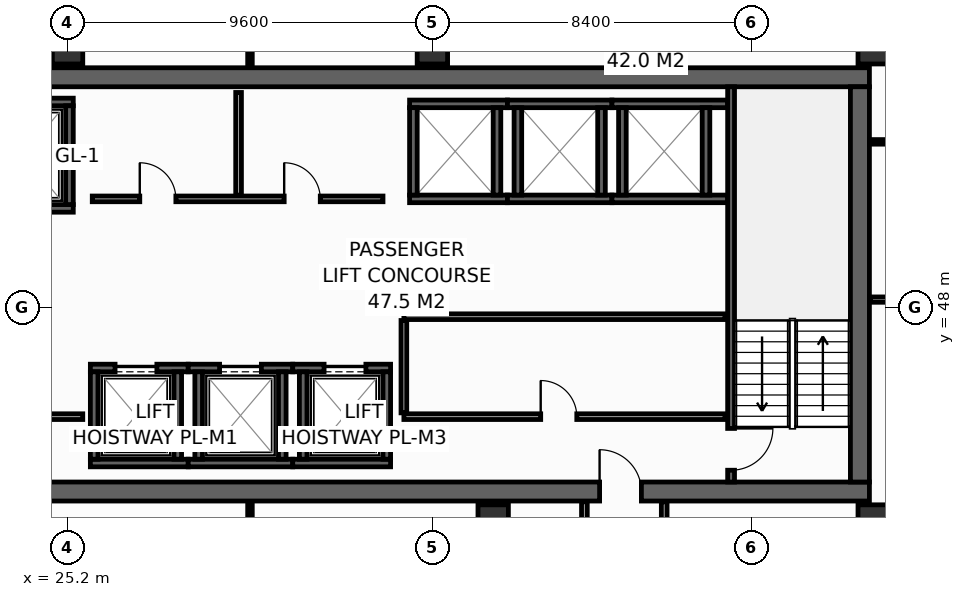
"""IFC4 building model, lengths in metres.
Left out: names, types, materials, properties, quantities, classifications, styles, units other than length and angle.
Written with IfcOpenShell. Run it as: python <this file> out.ifc"""

import sys

from ifc_helpers import new_model, si_unit, direction, frame, frame_2d, origin, origin_2d, place, context, subcontext, project, spatial, rectangle, hollow_rectangle, extrude, element, fill, save


model = new_model("IFC4")
c1 = context("Model", 3, precision=1e-05, world=origin(), true_north=direction((0.0, 1.0)))
c2 = subcontext(c1, "Body", "Model", "MODEL_VIEW")
j1 = project(units=[si_unit("LENGTHUNIT", "METRE"), si_unit("PLANEANGLEUNIT", "RADIAN")], contexts=[c1])
p1 = place(None, origin())
s1 = spatial("IfcSite", under=j1, at=p1, CompositionType="ELEMENT")
p2 = place(p1, origin())
s2 = spatial("IfcBuilding", under=s1, at=p2, CompositionType="ELEMENT")
p3 = place(p2, frame((0.0, 0.0, 182.8)))
s3 = spatial("IfcBuildingStorey", under=s2, at=p3, CompositionType="ELEMENT", Elevation=182.8)
p4 = place(p3, frame((13.6, 43.15, 0.0), z_axis=(0.0, 0.0, 1.0), x_axis=(1.0, 0.0, 0.0)))
e1 = element("IfcWall", 1, at=p4, inside=s3, PredefinedType="SHEAR", context=c2, shape_type="SweptSolid", body=[
    extrude(rectangle(XDim=32.7, YDim=0.5, at=frame_2d((16.35, 0.0))), origin(), (0.0, 0.0, 1.0), 3.55),
])
p5 = place(p4, frame((5.4, 0.0, 0.0)))
e2 = element("IfcOpeningElement", 2, at=p5, cuts=e1, PredefinedType="OPENING", context=c2, shape_type="SweptSolid", body=[
    extrude(rectangle(XDim=1.1, YDim=2.15, at=frame_2d((0.55, 1.075))), frame((0.0, 0.26, 0.0), z_axis=(0.0, -1.0, 0.0), x_axis=(1.0, 0.0, 0.0)), (0.0, 0.0, 1.0), 0.52),
])
p6 = place(p4, frame((25.6, 0.0, 0.0)))
e3 = element("IfcOpeningElement", 3, at=p6, cuts=e1, PredefinedType="OPENING", context=c2, shape_type="SweptSolid", body=[
    extrude(rectangle(XDim=1.1, YDim=2.15, at=frame_2d((0.55, 1.075))), frame((0.0, 0.26, 0.0), z_axis=(0.0, -1.0, 0.0), x_axis=(1.0, 0.0, 0.0)), (0.0, 0.0, 1.0), 0.52),
])
p7 = place(p3, frame((13.6, 54.05, 0.0), z_axis=(0.0, 0.0, 1.0), x_axis=(1.0, 0.0, 0.0)))
e4 = element("IfcWall", 4, at=p7, inside=s3, PredefinedType="SHEAR", context=c2, shape_type="SweptSolid", body=[
    extrude(rectangle(XDim=32.7, YDim=0.5, at=frame_2d((16.35, 0.0))), origin(), (0.0, 0.0, 1.0), 3.55),
])
p8 = place(p3, frame((46.05, 43.4, 0.0), z_axis=(0.0, 0.0, 1.0), x_axis=(0.0, 1.0, 0.0)))
e5 = element("IfcWall", 5, at=p8, inside=s3, PredefinedType="SHEAR", context=c2, shape_type="SweptSolid", body=[
    extrude(rectangle(XDim=10.4, YDim=0.5, at=frame_2d((5.2, 0.0))), origin(), (0.0, 0.0, 1.0), 3.55),
])
for number, where, z_axis, x_axis in (
    (6, (25.2, 54.8, 0.0), (0.0, 0.0, 1.0), (1.0, 0.0, 0.0)),
    (7, (34.8, 54.8, 0.0), (0.0, 0.0, 1.0), (1.0, 0.0, 0.0)),
    (8, (46.4, 54.8, 0.0), (0.0, 0.0, 1.0), (1.0, 0.0, 0.0)),
    (9, (36.4, 42.4, 0.0), (0.0, 0.0, 1.0), (1.0, 0.0, 0.0)),
    (10, (46.4, 42.4, 0.0), (0.0, 0.0, 1.0), (1.0, 0.0, 0.0)),
):
    element("IfcColumn", number, at=place(p3, frame(where, z_axis=z_axis, x_axis=x_axis)), inside=s3, PredefinedType="COLUMN", context=c2, shape_type="SweptSolid", body=[
        extrude(hollow_rectangle(XDim=0.8, YDim=0.8, WallThickness=0.036, at=origin_2d()), origin(), (0.0, 0.0, 1.0), 3.8),
    ])
p9 = place(p3, frame((22.5, 50.6, 0.0), z_axis=(0.0, 0.0, 1.0), x_axis=(1.0, 0.0, 0.0)))
e11 = element("IfcWall", 11, at=p9, inside=s3, PredefinedType="SHEAR", context=c2, shape_type="SweptSolid", body=[
    extrude(rectangle(XDim=2.85, YDim=0.2, at=frame_2d((1.425, 0.0))), origin(), (0.0, 0.0, 1.0), 3.55),
])
p10 = place(p9, frame((0.925, 0.0, 0.0)))
e12 = element("IfcOpeningElement", 12, at=p10, cuts=e11, PredefinedType="OPENING", context=c2, shape_type="SweptSolid", body=[
    extrude(rectangle(XDim=1.25, YDim=2.3, at=frame_2d((0.625, 1.15))), frame((0.0, 0.11, 0.0), z_axis=(0.0, -1.0, 0.0), x_axis=(1.0, 0.0, 0.0)), (0.0, 0.0, 1.0), 0.22),
])
p11 = place(p3, frame((22.5, 53.4, 0.0), z_axis=(0.0, 0.0, 1.0), x_axis=(1.0, 0.0, 0.0)))
e13 = element("IfcWall", 13, at=p11, inside=s3, PredefinedType="SHEAR", context=c2, shape_type="SweptSolid", body=[
    extrude(rectangle(XDim=2.85, YDim=0.2, at=frame_2d((1.425, 0.0))), origin(), (0.0, 0.0, 1.0), 3.55),
])
p12 = place(p3, frame((25.25, 50.7, 0.0), z_axis=(0.0, 0.0, 1.0), x_axis=(0.0, 1.0, 0.0)))
e14 = element("IfcWall", 14, at=p12, inside=s3, PredefinedType="SHEAR", context=c2, shape_type="SweptSolid", body=[
    extrude(rectangle(XDim=2.6, YDim=0.2, at=frame_2d((1.3, 0.0))), origin(), (0.0, 0.0, 1.0), 3.55),
])
p13 = place(p3, frame((25.8, 43.9, 0.0), z_axis=(0.0, 0.0, 1.0), x_axis=(1.0, 0.0, 0.0)))
e15 = element("IfcWall", 15, at=p13, inside=s3, PredefinedType="SHEAR", context=c2, shape_type="SweptSolid", body=[
    extrude(rectangle(XDim=2.575, YDim=0.2, at=frame_2d((1.288, 0.0))), origin(), (0.0, 0.0, 1.0), 3.55),
])
p14 = place(p3, frame((25.8, 46.4, 0.0), z_axis=(0.0, 0.0, 1.0), x_axis=(1.0, 0.0, 0.0)))
e16 = element("IfcWall", 16, at=p14, inside=s3, PredefinedType="SHEAR", context=c2, shape_type="SweptSolid", body=[
    extrude(rectangle(XDim=2.575, YDim=0.2, at=frame_2d((1.288, 0.0))), origin(), (0.0, 0.0, 1.0), 3.55),
])
p15 = place(p14, frame((0.65, 0.0, 0.0)))
e17 = element("IfcOpeningElement", 17, at=p15, cuts=e16, PredefinedType="OPENING", context=c2, shape_type="SweptSolid", body=[
    extrude(rectangle(XDim=1.1, YDim=2.2, at=frame_2d((0.55, 1.1))), frame((0.0, 0.11, 0.0), z_axis=(0.0, -1.0, 0.0), x_axis=(1.0, 0.0, 0.0)), (0.0, 0.0, 1.0), 0.22),
])
for number, where, z_axis, x_axis in (
    (18, (25.9, 44.0, 0.0), (0.0, 0.0, 1.0), (0.0, 1.0, 0.0)),
    (19, (28.1, 44.0, 0.0), (0.0, 0.0, 1.0), (0.0, 1.0, 0.0)),
):
    element("IfcWall", number, at=place(p3, frame(where, z_axis=z_axis, x_axis=x_axis)), inside=s3, PredefinedType="SHEAR", context=c2, shape_type="SweptSolid", body=[
        extrude(rectangle(XDim=2.3, YDim=0.2, at=frame_2d((1.15, 0.0))), origin(), (0.0, 0.0, 1.0), 3.55),
    ])
p16 = place(p3, frame((28.375, 43.9, 0.0), z_axis=(0.0, 0.0, 1.0), x_axis=(1.0, 0.0, 0.0)))
e20 = element("IfcWall", 20, at=p16, inside=s3, PredefinedType="SHEAR", context=c2, shape_type="SweptSolid", body=[
    extrude(rectangle(XDim=2.75, YDim=0.2, at=frame_2d((1.375, 0.0))), origin(), (0.0, 0.0, 1.0), 3.55),
])
p17 = place(p3, frame((28.375, 46.4, 0.0), z_axis=(0.0, 0.0, 1.0), x_axis=(1.0, 0.0, 0.0)))
e21 = element("IfcWall", 21, at=p17, inside=s3, PredefinedType="SHEAR", context=c2, shape_type="SweptSolid", body=[
    extrude(rectangle(XDim=2.75, YDim=0.2, at=frame_2d((1.375, 0.0))), origin(), (0.0, 0.0, 1.0), 3.55),
])
p18 = place(p17, frame((0.825, 0.0, 0.0)))
e22 = element("IfcOpeningElement", 22, at=p18, cuts=e21, PredefinedType="OPENING", context=c2, shape_type="SweptSolid", body=[
    extrude(rectangle(XDim=1.1, YDim=2.2, at=frame_2d((0.55, 1.1))), frame((0.0, 0.11, 0.0), z_axis=(0.0, -1.0, 0.0), x_axis=(1.0, 0.0, 0.0)), (0.0, 0.0, 1.0), 0.22),
])
for number, where, z_axis, x_axis in (
    (23, (28.65, 44.0, 0.0), (0.0, 0.0, 1.0), (0.0, 1.0, 0.0)),
    (24, (30.85, 44.0, 0.0), (0.0, 0.0, 1.0), (0.0, 1.0, 0.0)),
):
    element("IfcWall", number, at=place(p3, frame(where, z_axis=z_axis, x_axis=x_axis)), inside=s3, PredefinedType="SHEAR", context=c2, shape_type="SweptSolid", body=[
        extrude(rectangle(XDim=2.3, YDim=0.2, at=frame_2d((1.15, 0.0))), origin(), (0.0, 0.0, 1.0), 3.55),
    ])
p19 = place(p3, frame((31.125, 43.9, 0.0), z_axis=(0.0, 0.0, 1.0), x_axis=(1.0, 0.0, 0.0)))
e25 = element("IfcWall", 25, at=p19, inside=s3, PredefinedType="SHEAR", context=c2, shape_type="SweptSolid", body=[
    extrude(rectangle(XDim=2.575, YDim=0.2, at=frame_2d((1.288, 0.0))), origin(), (0.0, 0.0, 1.0), 3.55),
])
p20 = place(p3, frame((31.125, 46.4, 0.0), z_axis=(0.0, 0.0, 1.0), x_axis=(1.0, 0.0, 0.0)))
e26 = element("IfcWall", 26, at=p20, inside=s3, PredefinedType="SHEAR", context=c2, shape_type="SweptSolid", body=[
    extrude(rectangle(XDim=2.575, YDim=0.2, at=frame_2d((1.288, 0.0))), origin(), (0.0, 0.0, 1.0), 3.55),
])
p21 = place(p20, frame((0.825, 0.0, 0.0)))
e27 = element("IfcOpeningElement", 27, at=p21, cuts=e26, PredefinedType="OPENING", context=c2, shape_type="SweptSolid", body=[
    extrude(rectangle(XDim=1.1, YDim=2.2, at=frame_2d((0.55, 1.1))), frame((0.0, 0.11, 0.0), z_axis=(0.0, -1.0, 0.0), x_axis=(1.0, 0.0, 0.0)), (0.0, 0.0, 1.0), 0.22),
])
for number, where, z_axis, x_axis in (
    (28, (31.4, 44.0, 0.0), (0.0, 0.0, 1.0), (0.0, 1.0, 0.0)),
    (29, (33.6, 44.0, 0.0), (0.0, 0.0, 1.0), (0.0, 1.0, 0.0)),
):
    element("IfcWall", number, at=place(p3, frame(where, z_axis=z_axis, x_axis=x_axis)), inside=s3, PredefinedType="SHEAR", context=c2, shape_type="SweptSolid", body=[
        extrude(rectangle(XDim=2.3, YDim=0.2, at=frame_2d((1.15, 0.0))), origin(), (0.0, 0.0, 1.0), 3.55),
    ])
for number, where, z_axis, x_axis in (
    (30, (34.2, 50.85, 0.0), (0.0, 0.0, 1.0), (1.0, 0.0, 0.0)),
    (31, (34.2, 53.35, 0.0), (0.0, 0.0, 1.0), (1.0, 0.0, 0.0)),
):
    element("IfcWall", number, at=place(p3, frame(where, z_axis=z_axis, x_axis=x_axis)), inside=s3, PredefinedType="SHEAR", context=c2, shape_type="SweptSolid", body=[
        extrude(rectangle(XDim=2.575, YDim=0.2, at=frame_2d((1.288, 0.0))), origin(), (0.0, 0.0, 1.0), 3.55),
    ])
for number, where, z_axis, x_axis in (
    (32, (34.3, 50.95, 0.0), (0.0, 0.0, 1.0), (0.0, 1.0, 0.0)),
    (33, (36.5, 50.95, 0.0), (0.0, 0.0, 1.0), (0.0, 1.0, 0.0)),
):
    element("IfcWall", number, at=place(p3, frame(where, z_axis=z_axis, x_axis=x_axis)), inside=s3, PredefinedType="SHEAR", context=c2, shape_type="SweptSolid", body=[
        extrude(rectangle(XDim=2.3, YDim=0.2, at=frame_2d((1.15, 0.0))), origin(), (0.0, 0.0, 1.0), 3.55),
    ])
for number, where, z_axis, x_axis in (
    (34, (36.775, 50.85, 0.0), (0.0, 0.0, 1.0), (1.0, 0.0, 0.0)),
    (35, (36.775, 53.35, 0.0), (0.0, 0.0, 1.0), (1.0, 0.0, 0.0)),
):
    element("IfcWall", number, at=place(p3, frame(where, z_axis=z_axis, x_axis=x_axis)), inside=s3, PredefinedType="SHEAR", context=c2, shape_type="SweptSolid", body=[
        extrude(rectangle(XDim=2.75, YDim=0.2, at=frame_2d((1.375, 0.0))), origin(), (0.0, 0.0, 1.0), 3.55),
    ])
for number, where, z_axis, x_axis in (
    (36, (37.05, 50.95, 0.0), (0.0, 0.0, 1.0), (0.0, 1.0, 0.0)),
    (37, (39.25, 50.95, 0.0), (0.0, 0.0, 1.0), (0.0, 1.0, 0.0)),
):
    element("IfcWall", number, at=place(p3, frame(where, z_axis=z_axis, x_axis=x_axis)), inside=s3, PredefinedType="SHEAR", context=c2, shape_type="SweptSolid", body=[
        extrude(rectangle(XDim=2.3, YDim=0.2, at=frame_2d((1.15, 0.0))), origin(), (0.0, 0.0, 1.0), 3.55),
    ])
for number, where, z_axis, x_axis in (
    (38, (39.525, 50.85, 0.0), (0.0, 0.0, 1.0), (1.0, 0.0, 0.0)),
    (39, (39.525, 53.35, 0.0), (0.0, 0.0, 1.0), (1.0, 0.0, 0.0)),
):
    element("IfcWall", number, at=place(p3, frame(where, z_axis=z_axis, x_axis=x_axis)), inside=s3, PredefinedType="SHEAR", context=c2, shape_type="SweptSolid", body=[
        extrude(rectangle(XDim=3.045, YDim=0.2, at=frame_2d((1.522, 0.0))), origin(), (0.0, 0.0, 1.0), 3.55),
    ])
for number, where, z_axis, x_axis in (
    (40, (39.8, 50.95, 0.0), (0.0, 0.0, 1.0), (0.0, 1.0, 0.0)),
    (41, (42.0, 50.95, 0.0), (0.0, 0.0, 1.0), (0.0, 1.0, 0.0)),
):
    element("IfcWall", number, at=place(p3, frame(where, z_axis=z_axis, x_axis=x_axis)), inside=s3, PredefinedType="SHEAR", context=c2, shape_type="SweptSolid", body=[
        extrude(rectangle(XDim=2.3, YDim=0.2, at=frame_2d((1.15, 0.0))), origin(), (0.0, 0.0, 1.0), 3.55),
    ])
p22 = place(p3, frame((42.66, 53.8, 0.0), z_axis=(0.0, 0.0, 1.0), x_axis=(0.0, -1.0, 0.0)))
e42 = element("IfcWall", 42, at=p22, inside=s3, PredefinedType="SHEAR", context=c2, shape_type="SweptSolid", body=[
    extrude(rectangle(XDim=10.4, YDim=0.18, at=frame_2d((5.2, 0.0))), origin(), (0.0, 0.0, 1.0), 3.55),
])
p23 = place(p22, frame((8.99, 0.0, 0.0)))
e43 = element("IfcOpeningElement", 43, at=p23, cuts=e42, PredefinedType="OPENING", context=c2, shape_type="SweptSolid", body=[
    extrude(rectangle(XDim=1.1, YDim=2.15, at=frame_2d((0.55, 1.075))), frame((0.0, 0.1, 0.0), z_axis=(0.0, -1.0, 0.0), x_axis=(1.0, 0.0, 0.0)), (0.0, 0.0, 1.0), 0.2),
])
p24 = place(p3, frame((22.68, 45.12, 0.0), z_axis=(0.0, 0.0, 1.0), x_axis=(1.0, 0.0, 0.0)))
e44 = element("IfcWall", 44, at=p24, inside=s3, PredefinedType="PARTITIONING", context=c2, shape_type="SweptSolid", body=[
    extrude(rectangle(XDim=2.92, YDim=0.15, at=frame_2d((1.46, 0.0))), origin(), (0.0, 0.0, 1.0), 3.55),
])
p25 = place(p24, frame((0.85, 0.0, 0.0)))
e45 = element("IfcOpeningElement", 45, at=p25, cuts=e44, PredefinedType="OPENING", context=c2, shape_type="SweptSolid", body=[
    extrude(rectangle(XDim=1.1, YDim=2.15, at=frame_2d((0.55, 1.075))), frame((0.0, 0.085, 0.0), z_axis=(0.0, -1.0, 0.0), x_axis=(1.0, 0.0, 0.0)), (0.0, 0.0, 1.0), 0.17),
])
p26 = place(p3, frame((34.05, 45.12, 0.0), z_axis=(0.0, 0.0, 1.0), x_axis=(1.0, 0.0, 0.0)))
e46 = element("IfcWall", 46, at=p26, inside=s3, PredefinedType="PARTITIONING", context=c2, shape_type="SweptSolid", body=[
    extrude(rectangle(XDim=8.45, YDim=0.15, at=frame_2d((4.225, 0.0))), origin(), (0.0, 0.0, 1.0), 3.55),
])
p27 = place(p26, frame((3.6, 0.0, 0.0)))
e47 = element("IfcOpeningElement", 47, at=p27, cuts=e46, PredefinedType="OPENING", context=c2, shape_type="SweptSolid", body=[
    extrude(rectangle(XDim=0.95, YDim=2.15, at=frame_2d((0.475, 1.075))), frame((0.0, 0.085, 0.0), z_axis=(0.0, -1.0, 0.0), x_axis=(1.0, 0.0, 0.0)), (0.0, 0.0, 1.0), 0.17),
])
p28 = place(p3, frame((34.05, 47.75, 0.0), z_axis=(0.0, 0.0, 1.0), x_axis=(1.0, 0.0, 0.0)))
e48 = element("IfcWall", 48, at=p28, inside=s3, PredefinedType="PARTITIONING", context=c2, shape_type="SweptSolid", body=[
    extrude(rectangle(XDim=8.45, YDim=0.15, at=frame_2d((4.225, 0.0))), origin(), (0.0, 0.0, 1.0), 3.55),
])
p29 = place(p3, frame((34.05, 45.22, 0.0), z_axis=(0.0, 0.0, 1.0), x_axis=(0.0, 1.0, 0.0)))
e49 = element("IfcWall", 49, at=p29, inside=s3, PredefinedType="PARTITIONING", context=c2, shape_type="SweptSolid", body=[
    extrude(rectangle(XDim=2.43, YDim=0.15, at=frame_2d((1.215, 0.0))), origin(), (0.0, 0.0, 1.0), 3.55),
])
p30 = place(p3, frame((25.85, 50.85, 0.0), z_axis=(0.0, 0.0, 1.0), x_axis=(1.0, 0.0, 0.0)))
e50 = element("IfcWall", 50, at=p30, inside=s3, PredefinedType="PARTITIONING", context=c2, shape_type="SweptSolid", body=[
    extrude(rectangle(XDim=7.65, YDim=0.15, at=frame_2d((3.825, 0.0))), origin(), (0.0, 0.0, 1.0), 3.55),
])
p31 = place(p30, frame((1.25, 0.0, 0.0)))
e51 = element("IfcOpeningElement", 51, at=p31, cuts=e50, PredefinedType="OPENING", context=c2, shape_type="SweptSolid", body=[
    extrude(rectangle(XDim=0.95, YDim=2.15, at=frame_2d((0.475, 1.075))), frame((0.0, 0.085, 0.0), z_axis=(0.0, -1.0, 0.0), x_axis=(1.0, 0.0, 0.0)), (0.0, 0.0, 1.0), 0.17),
])
p32 = place(p30, frame((5.05, 0.0, 0.0)))
e52 = element("IfcOpeningElement", 52, at=p32, cuts=e50, PredefinedType="OPENING", context=c2, shape_type="SweptSolid", body=[
    extrude(rectangle(XDim=0.95, YDim=2.15, at=frame_2d((0.475, 1.075))), frame((0.0, 0.085, 0.0), z_axis=(0.0, -1.0, 0.0), x_axis=(1.0, 0.0, 0.0)), (0.0, 0.0, 1.0), 0.17),
])
p33 = place(p3, frame((29.7, 50.95, 0.0), z_axis=(0.0, 0.0, 1.0), x_axis=(0.0, 1.0, 0.0)))
e53 = element("IfcWall", 53, at=p33, inside=s3, PredefinedType="PARTITIONING", context=c2, shape_type="SweptSolid", body=[
    extrude(rectangle(XDim=2.7, YDim=0.15, at=frame_2d((1.35, 0.0))), origin(), (0.0, 0.0, 1.0), 3.55),
])
p34 = place(p3, frame((46.15, 41.04, 0.0), z_axis=(0.0, 0.0, 1.0), x_axis=(0.0, 1.0, 0.0)))
e54 = element("IfcWall", 54, at=p34, inside=s3, PredefinedType="PARTITIONING", context=c2, shape_type="SweptSolid", body=[
    extrude(rectangle(XDim=1.84, YDim=0.14, at=frame_2d((0.92, 0.0))), origin(), (0.0, 0.0, 1.0), 3.55),
])
p35 = place(p3, frame((46.32, 48.2, 0.0), z_axis=(0.0, 0.0, 1.0), x_axis=(1.0, 0.0, 0.0)))
e55 = element("IfcWall", 55, at=p35, inside=s3, PredefinedType="PARTITIONING", context=c2, shape_type="SweptSolid", body=[
    extrude(rectangle(XDim=3.88, YDim=0.14, at=frame_2d((1.94, 0.0))), origin(), (0.0, 0.0, 1.0), 3.55),
])
p36 = place(p3, frame((46.32, 52.35, 0.0), z_axis=(0.0, 0.0, 1.0), x_axis=(1.0, 0.0, 0.0)))
e56 = element("IfcWall", 56, at=p36, inside=s3, PredefinedType="PARTITIONING", context=c2, shape_type="SweptSolid", body=[
    extrude(rectangle(XDim=3.88, YDim=0.12, at=frame_2d((1.94, 0.0))), origin(), (0.0, 0.0, 1.0), 3.55),
])
p37 = place(p3, frame((30.0, 54.32, 0.0), z_axis=(0.0, 0.0, 1.0), x_axis=(0.0, 1.0, 0.0)))
e57 = element("IfcWall", 57, at=p37, inside=s3, PredefinedType="PARTITIONING", context=c2, shape_type="SweptSolid", body=[
    extrude(rectangle(XDim=1.675, YDim=0.12, at=frame_2d((0.837, 0.0))), origin(), (0.0, 0.0, 1.0), 2.935),
])
for number, where, z_axis, x_axis in (
    (58, (38.8, 40.95, 0.0), (0.0, 0.0, 1.0), (0.0, 1.0, 0.0)),
    (59, (40.9, 40.95, 0.0), (0.0, 0.0, 1.0), (0.0, 1.0, 0.0)),
):
    element("IfcWall", number, at=place(p3, frame(where, z_axis=z_axis, x_axis=x_axis)), inside=s3, PredefinedType="PARTITIONING", context=c2, shape_type="SweptSolid", body=[
        extrude(rectangle(XDim=1.93, YDim=0.15, at=frame_2d((0.965, 0.0))), origin(), (0.0, 0.0, 1.0), 3.55),
    ])
p38 = place(p3, frame((30.0, 40.95, 0.0), z_axis=(0.0, 0.0, 1.0), x_axis=(0.0, 1.0, 0.0)))
e60 = element("IfcWall", 60, at=p38, inside=s3, PredefinedType="PARTITIONING", context=c2, shape_type="SweptSolid", body=[
    extrude(rectangle(XDim=1.93, YDim=0.12, at=frame_2d((0.965, 0.0))), origin(), (0.0, 0.0, 1.0), 2.835),
])
p39 = place(p15, origin())
e61 = element("IfcDoor", 61, at=p39, inside=s3, OperationType="SLIDING_TO_LEFT", PredefinedType="DOOR", context=c2, shape_type="SweptSolid", body=[
    extrude(rectangle(XDim=1.1, YDim=2.2, at=frame_2d((0.55, 1.1))), frame((0.0, 0.025, 0.0), z_axis=(0.0, -1.0, 0.0), x_axis=(1.0, 0.0, 0.0)), (0.0, 0.0, 1.0), 0.05),
])
fill(e17, e61)
p40 = place(p18, origin())
e62 = element("IfcDoor", 62, at=p40, inside=s3, OperationType="SLIDING_TO_LEFT", PredefinedType="DOOR", context=c2, shape_type="SweptSolid", body=[
    extrude(rectangle(XDim=1.1, YDim=2.2, at=frame_2d((0.55, 1.1))), frame((0.0, 0.025, 0.0), z_axis=(0.0, -1.0, 0.0), x_axis=(1.0, 0.0, 0.0)), (0.0, 0.0, 1.0), 0.05),
])
fill(e22, e62)
p41 = place(p21, origin())
e63 = element("IfcDoor", 63, at=p41, inside=s3, OperationType="SLIDING_TO_LEFT", PredefinedType="DOOR", context=c2, shape_type="SweptSolid", body=[
    extrude(rectangle(XDim=1.1, YDim=2.2, at=frame_2d((0.55, 1.1))), frame((0.0, 0.025, 0.0), z_axis=(0.0, -1.0, 0.0), x_axis=(1.0, 0.0, 0.0)), (0.0, 0.0, 1.0), 0.05),
])
fill(e27, e63)
p42 = place(p23, origin())
e64 = element("IfcDoor", 64, at=p42, inside=s3, OperationType="SINGLE_SWING_LEFT", PredefinedType="DOOR", context=c2, shape_type="SweptSolid", body=[
    extrude(rectangle(XDim=1.1, YDim=2.15, at=frame_2d((0.55, 1.075))), frame((0.0, 0.025, 0.0), z_axis=(0.0, -1.0, 0.0), x_axis=(1.0, 0.0, 0.0)), (0.0, 0.0, 1.0), 0.05),
])
fill(e43, e64)
p43 = place(p6, origin())
e65 = element("IfcDoor", 65, at=p43, inside=s3, OperationType="SINGLE_SWING_LEFT", PredefinedType="DOOR", context=c2, shape_type="SweptSolid", body=[
    extrude(rectangle(XDim=1.1, YDim=2.15, at=frame_2d((0.55, 1.075))), frame((0.0, 0.025, 0.0), z_axis=(0.0, -1.0, 0.0), x_axis=(1.0, 0.0, 0.0)), (0.0, 0.0, 1.0), 0.05),
])
fill(e3, e65)
p44 = place(p27, origin())
e66 = element("IfcDoor", 66, at=p44, inside=s3, OperationType="SINGLE_SWING_LEFT", PredefinedType="DOOR", context=c2, shape_type="SweptSolid", body=[
    extrude(rectangle(XDim=0.95, YDim=2.15, at=frame_2d((0.475, 1.075))), frame((0.0, 0.025, 0.0), z_axis=(0.0, -1.0, 0.0), x_axis=(1.0, 0.0, 0.0)), (0.0, 0.0, 1.0), 0.05),
])
fill(e47, e66)
p45 = place(p31, origin())
e67 = element("IfcDoor", 67, at=p45, inside=s3, OperationType="SINGLE_SWING_LEFT", PredefinedType="DOOR", context=c2, shape_type="SweptSolid", body=[
    extrude(rectangle(XDim=0.95, YDim=2.15, at=frame_2d((0.475, 1.075))), frame((0.0, 0.025, 0.0), z_axis=(0.0, -1.0, 0.0), x_axis=(1.0, 0.0, 0.0)), (0.0, 0.0, 1.0), 0.05),
])
fill(e51, e67)
p46 = place(p32, origin())
e68 = element("IfcDoor", 68, at=p46, inside=s3, OperationType="SINGLE_SWING_LEFT", PredefinedType="DOOR", context=c2, shape_type="SweptSolid", body=[
    extrude(rectangle(XDim=0.95, YDim=2.15, at=frame_2d((0.475, 1.075))), frame((0.0, 0.025, 0.0), z_axis=(0.0, -1.0, 0.0), x_axis=(1.0, 0.0, 0.0)), (0.0, 0.0, 1.0), 0.05),
])
fill(e52, e68)
save(model, sys.argv[1])
